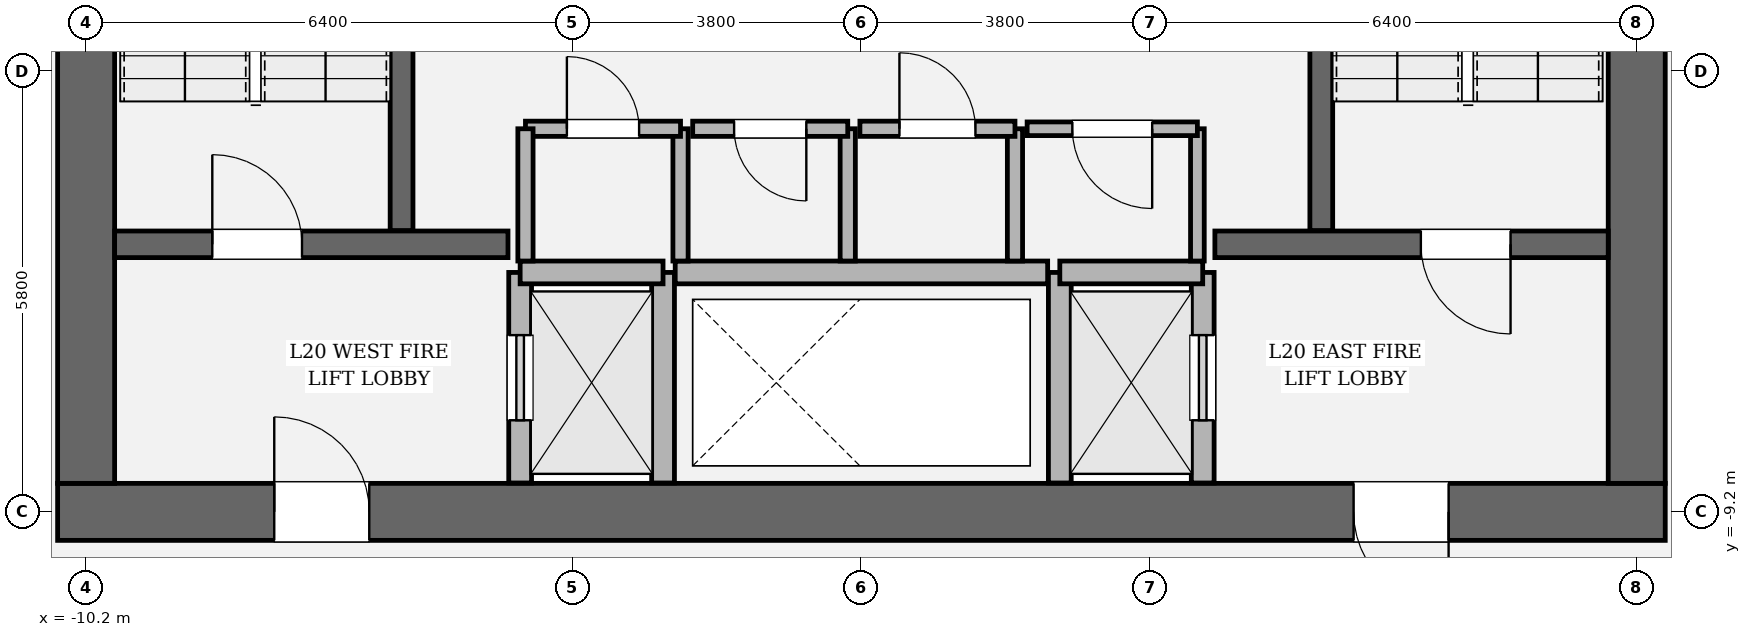
"""IFC4 building model, lengths in metres.
Left out: names, types, materials, properties, quantities, classifications, styles, units other than length and angle.
Written with IfcOpenShell. Run it as: python <this file> out.ifc"""

import sys

from ifc_helpers import new_model, si_unit, direction, frame, frame_2d, origin, place, context, subcontext, project, spatial, rectangle, extrude, element, fill, save


model = new_model("IFC4")
c1 = context("Model", 3, precision=1e-05, world=origin(), true_north=direction((0.0, 1.0)))
c2 = subcontext(c1, "Body", "Model", "MODEL_VIEW")
j1 = project(units=[si_unit("LENGTHUNIT", "METRE"), si_unit("PLANEANGLEUNIT", "RADIAN")], contexts=[c1])
p1 = place(None, origin())
s1 = spatial("IfcSite", under=j1, at=p1, CompositionType="ELEMENT")
p2 = place(p1, origin())
s2 = spatial("IfcBuilding", under=s1, at=p2, CompositionType="ELEMENT")
p3 = place(p2, frame((0.0, 0.0, 88.95)))
s3 = spatial("IfcBuildingStorey", under=s2, at=p3, CompositionType="ELEMENT", Elevation=88.95)
p4 = place(p3, frame((10.575, -9.2, 0.0), z_axis=(0.0, 0.0, 1.0), x_axis=(-1.0, 0.0, 0.0)))
e1 = element("IfcWall", 1, at=p4, inside=s3, PredefinedType="SHEAR", context=c2, shape_type="SweptSolid", body=[
    extrude(rectangle(XDim=21.15, YDim=0.75, at=frame_2d((10.575, 0.0))), origin(), (0.0, 0.0, 1.0), 4.05),
])
p5 = place(p4, frame((2.85, 0.0, 0.0)))
e2 = element("IfcOpeningElement", 2, at=p5, cuts=e1, PredefinedType="OPENING", context=c2, shape_type="SweptSolid", body=[
    extrude(rectangle(XDim=1.25, YDim=2.25, at=frame_2d((0.625, 1.125))), frame((0.0, 0.385, 0.0), z_axis=(0.0, -1.0, 0.0), x_axis=(1.0, 0.0, 0.0)), (0.0, 0.0, 1.0), 0.77),
])
p6 = place(p4, frame((17.05, 0.0, 0.0)))
e3 = element("IfcOpeningElement", 3, at=p6, cuts=e1, PredefinedType="OPENING", context=c2, shape_type="SweptSolid", body=[
    extrude(rectangle(XDim=1.25, YDim=2.25, at=frame_2d((0.625, 1.125))), frame((0.0, 0.385, 0.0), z_axis=(0.0, -1.0, 0.0), x_axis=(1.0, 0.0, 0.0)), (0.0, 0.0, 1.0), 0.77),
])
p7 = place(p3, frame((-10.2, -8.825, 0.0), z_axis=(0.0, 0.0, 1.0), x_axis=(0.0, 1.0, 0.0)))
e4 = element("IfcWall", 4, at=p7, inside=s3, PredefinedType="SHEAR", context=c2, shape_type="SweptSolid", body=[
    extrude(rectangle(XDim=17.65, YDim=0.75, at=frame_2d((8.825, 0.0))), origin(), (0.0, 0.0, 1.0), 4.05),
])
p8 = place(p7, frame((12.615, 0.0, 0.0)))
e5 = element("IfcOpeningElement", 5, at=p8, cuts=e4, PredefinedType="OPENING", context=c2, shape_type="SweptSolid", body=[
    extrude(rectangle(XDim=1.18, YDim=2.2, at=frame_2d((0.59, 1.1))), frame((0.0, 0.385, 0.0), z_axis=(0.0, -1.0, 0.0), x_axis=(1.0, 0.0, 0.0)), (0.0, 0.0, 1.0), 0.77),
])
p9 = place(p3, frame((10.2, 8.825, 0.0), z_axis=(0.0, 0.0, 1.0), x_axis=(0.0, -1.0, 0.0)))
e6 = element("IfcWall", 6, at=p9, inside=s3, PredefinedType="SHEAR", context=c2, shape_type="SweptSolid", body=[
    extrude(rectangle(XDim=17.65, YDim=0.75, at=frame_2d((8.825, 0.0))), origin(), (0.0, 0.0, 1.0), 4.05),
])
p10 = place(p9, frame((3.855, 0.0, 0.0)))
e7 = element("IfcOpeningElement", 7, at=p10, cuts=e6, PredefinedType="OPENING", context=c2, shape_type="SweptSolid", body=[
    extrude(rectangle(XDim=1.18, YDim=2.2, at=frame_2d((0.59, 1.1))), frame((0.0, 0.385, 0.0), z_axis=(0.0, -1.0, 0.0), x_axis=(1.0, 0.0, 0.0)), (0.0, 0.0, 1.0), 0.77),
])
for number, where, z_axis, x_axis in (
    (8, (-6.05, -5.5, 0.0), (0.0, 0.0, 1.0), (0.0, 1.0, 0.0)),
    (9, (6.05, 3.45, 0.0), (0.0, 0.0, 1.0), (0.0, -1.0, 0.0)),
):
    element("IfcWall", number, at=place(p3, frame(where, z_axis=z_axis, x_axis=x_axis)), inside=s3, PredefinedType="SOLIDWALL", context=c2, shape_type="SweptSolid", body=[
        extrude(rectangle(XDim=8.95, YDim=0.3, at=frame_2d((4.475, 0.0))), origin(), (0.0, 0.0, 1.0), 4.05),
    ])
p11 = place(p3, frame((-9.825, -5.68, 0.0), z_axis=(0.0, 0.0, 1.0), x_axis=(1.0, 0.0, 0.0)))
e10 = element("IfcWall", 10, at=p11, inside=s3, PredefinedType="SOLIDWALL", context=c2, shape_type="SweptSolid", body=[
    extrude(rectangle(XDim=5.175, YDim=0.35, at=frame_2d((2.587, 0.0))), origin(), (0.0, 0.0, 1.0), 4.05),
])
p12 = place(p11, frame((1.285, 0.0, 0.0)))
e11 = element("IfcOpeningElement", 11, at=p12, cuts=e10, PredefinedType="OPENING", context=c2, shape_type="SweptSolid", body=[
    extrude(rectangle(XDim=1.18, YDim=2.2, at=frame_2d((0.59, 1.1))), frame((0.0, 0.185, 0.0), z_axis=(0.0, -1.0, 0.0), x_axis=(1.0, 0.0, 0.0)), (0.0, 0.0, 1.0), 0.37),
])
p13 = place(p3, frame((4.65, -5.68, 0.0), z_axis=(0.0, 0.0, 1.0), x_axis=(1.0, 0.0, 0.0)))
e12 = element("IfcWall", 12, at=p13, inside=s3, PredefinedType="SOLIDWALL", context=c2, shape_type="SweptSolid", body=[
    extrude(rectangle(XDim=5.175, YDim=0.35, at=frame_2d((2.587, 0.0))), origin(), (0.0, 0.0, 1.0), 4.05),
])
p14 = place(p13, frame((2.71, 0.0, 0.0)))
e13 = element("IfcOpeningElement", 13, at=p14, cuts=e12, PredefinedType="OPENING", context=c2, shape_type="SweptSolid", body=[
    extrude(rectangle(XDim=1.18, YDim=2.2, at=frame_2d((0.59, 1.1))), frame((0.0, 0.185, 0.0), z_axis=(0.0, -1.0, 0.0), x_axis=(1.0, 0.0, 0.0)), (0.0, 0.0, 1.0), 0.37),
])
p15 = place(p3, frame((-4.49, -8.82, 0.0), z_axis=(0.0, 0.0, 1.0), x_axis=(0.0, 1.0, 0.0)))
e14 = element("IfcWall", 14, at=p15, inside=s3, PredefinedType="SOLIDWALL", context=c2, shape_type="SweptSolid", body=[
    extrude(rectangle(XDim=2.77, YDim=0.3, at=frame_2d((1.385, 0.0))), origin(), (0.0, 0.0, 1.0), 3.77),
])
p16 = place(p15, frame((0.825, 0.0, 0.0)))
e15 = element("IfcOpeningElement", 15, at=p16, cuts=e14, PredefinedType="OPENING", context=c2, shape_type="SweptSolid", body=[
    extrude(rectangle(XDim=1.12, YDim=2.25, at=frame_2d((0.56, 1.125))), frame((0.0, 0.16, 0.0), z_axis=(0.0, -1.0, 0.0), x_axis=(1.0, 0.0, 0.0)), (0.0, 0.0, 1.0), 0.32),
])
p17 = place(p3, frame((-2.61, -8.82, 0.0), z_axis=(0.0, 0.0, 1.0), x_axis=(0.0, 1.0, 0.0)))
e16 = element("IfcWall", 16, at=p17, inside=s3, PredefinedType="SOLIDWALL", context=c2, shape_type="SweptSolid", body=[
    extrude(rectangle(XDim=2.77, YDim=0.3, at=frame_2d((1.385, 0.0))), origin(), (0.0, 0.0, 1.0), 3.77),
])
p18 = place(p3, frame((-4.49, -6.05, 0.0), z_axis=(0.0, 0.0, 1.0), x_axis=(1.0, 0.0, 0.0)))
e17 = element("IfcWall", 17, at=p18, inside=s3, PredefinedType="SOLIDWALL", context=c2, shape_type="SweptSolid", body=[
    extrude(rectangle(XDim=1.88, YDim=0.3, at=frame_2d((0.94, 0.0))), origin(), (0.0, 0.0, 1.0), 3.77),
])
p19 = place(p3, frame((4.49, -8.82, 0.0), z_axis=(0.0, 0.0, 1.0), x_axis=(0.0, 1.0, 0.0)))
e18 = element("IfcWall", 18, at=p19, inside=s3, PredefinedType="SOLIDWALL", context=c2, shape_type="SweptSolid", body=[
    extrude(rectangle(XDim=2.77, YDim=0.3, at=frame_2d((1.385, 0.0))), origin(), (0.0, 0.0, 1.0), 3.77),
])
p20 = place(p19, frame((0.825, 0.0, 0.0)))
e19 = element("IfcOpeningElement", 19, at=p20, cuts=e18, PredefinedType="OPENING", context=c2, shape_type="SweptSolid", body=[
    extrude(rectangle(XDim=1.12, YDim=2.25, at=frame_2d((0.56, 1.125))), frame((0.0, 0.16, 0.0), z_axis=(0.0, -1.0, 0.0), x_axis=(1.0, 0.0, 0.0)), (0.0, 0.0, 1.0), 0.32),
])
p21 = place(p3, frame((2.61, -8.82, 0.0), z_axis=(0.0, 0.0, 1.0), x_axis=(0.0, 1.0, 0.0)))
e20 = element("IfcWall", 20, at=p21, inside=s3, PredefinedType="SOLIDWALL", context=c2, shape_type="SweptSolid", body=[
    extrude(rectangle(XDim=2.77, YDim=0.3, at=frame_2d((1.385, 0.0))), origin(), (0.0, 0.0, 1.0), 3.77),
])
p22 = place(p3, frame((2.61, -6.05, 0.0), z_axis=(0.0, 0.0, 1.0), x_axis=(1.0, 0.0, 0.0)))
e21 = element("IfcWall", 21, at=p22, inside=s3, PredefinedType="SOLIDWALL", context=c2, shape_type="SweptSolid", body=[
    extrude(rectangle(XDim=1.88, YDim=0.3, at=frame_2d((0.94, 0.0))), origin(), (0.0, 0.0, 1.0), 3.77),
])
p23 = place(p3, frame((-2.45, -6.05, 0.0), z_axis=(0.0, 0.0, 1.0), x_axis=(1.0, 0.0, 0.0)))
e22 = element("IfcWall", 22, at=p23, inside=s3, PredefinedType="SOLIDWALL", context=c2, shape_type="SweptSolid", body=[
    extrude(rectangle(XDim=4.9, YDim=0.3, at=frame_2d((2.45, 0.0))), origin(), (0.0, 0.0, 1.0), 3.77),
])
p24 = place(p3, frame((-2.38, -5.9, 0.0), z_axis=(0.0, 0.0, 1.0), x_axis=(0.0, 1.0, 0.0)))
e23 = element("IfcWall", 23, at=p24, inside=s3, PredefinedType="SOLIDWALL", context=c2, shape_type="SweptSolid", body=[
    extrude(rectangle(XDim=1.74, YDim=0.2, at=frame_2d((0.87, 0.0))), origin(), (0.0, 0.0, 1.0), 3.77),
])
p25 = place(p3, frame((-2.38, -4.16, 0.0), z_axis=(0.0, 0.0, 1.0), x_axis=(-1.0, 0.0, 0.0)))
e24 = element("IfcWall", 24, at=p25, inside=s3, PredefinedType="SOLIDWALL", context=c2, shape_type="SweptSolid", body=[
    extrude(rectangle(XDim=2.04, YDim=0.2, at=frame_2d((1.02, 0.0))), origin(), (0.0, 0.0, 1.0), 3.77),
])
p26 = place(p25, frame((0.545, 0.0, 0.0)))
e25 = element("IfcOpeningElement", 25, at=p26, cuts=e24, PredefinedType="OPENING", context=c2, shape_type="SweptSolid", body=[
    extrude(rectangle(XDim=0.95, YDim=2.15, at=frame_2d((0.475, 1.075))), frame((0.0, 0.11, 0.0), z_axis=(0.0, -1.0, 0.0), x_axis=(1.0, 0.0, 0.0)), (0.0, 0.0, 1.0), 0.22),
])
for number, where, z_axis, x_axis in (
    (26, (-4.42, -4.16, 0.0), (0.0, 0.0, 1.0), (0.0, -1.0, 0.0)),
    (27, (-0.18, -5.9, 0.0), (0.0, 0.0, 1.0), (0.0, 1.0, 0.0)),
):
    element("IfcWall", number, at=place(p3, frame(where, z_axis=z_axis, x_axis=x_axis)), inside=s3, PredefinedType="SOLIDWALL", context=c2, shape_type="SweptSolid", body=[
        extrude(rectangle(XDim=1.74, YDim=0.2, at=frame_2d((0.87, 0.0))), origin(), (0.0, 0.0, 1.0), 3.77),
    ])
p27 = place(p3, frame((-0.18, -4.16, 0.0), z_axis=(0.0, 0.0, 1.0), x_axis=(-1.0, 0.0, 0.0)))
e28 = element("IfcWall", 28, at=p27, inside=s3, PredefinedType="SOLIDWALL", context=c2, shape_type="SweptSolid", body=[
    extrude(rectangle(XDim=2.04, YDim=0.2, at=frame_2d((1.02, 0.0))), origin(), (0.0, 0.0, 1.0), 3.77),
])
p28 = place(p27, frame((0.545, 0.0, 0.0)))
e29 = element("IfcOpeningElement", 29, at=p28, cuts=e28, PredefinedType="OPENING", context=c2, shape_type="SweptSolid", body=[
    extrude(rectangle(XDim=0.95, YDim=2.15, at=frame_2d((0.475, 1.075))), frame((0.0, 0.11, 0.0), z_axis=(0.0, -1.0, 0.0), x_axis=(1.0, 0.0, 0.0)), (0.0, 0.0, 1.0), 0.22),
])
p29 = place(p3, frame((2.02, -5.9, 0.0), z_axis=(0.0, 0.0, 1.0), x_axis=(0.0, 1.0, 0.0)))
e30 = element("IfcWall", 30, at=p29, inside=s3, PredefinedType="SOLIDWALL", context=c2, shape_type="SweptSolid", body=[
    extrude(rectangle(XDim=1.74, YDim=0.2, at=frame_2d((0.87, 0.0))), origin(), (0.0, 0.0, 1.0), 3.77),
])
p30 = place(p3, frame((2.02, -4.16, 0.0), z_axis=(0.0, 0.0, 1.0), x_axis=(-1.0, 0.0, 0.0)))
e31 = element("IfcWall", 31, at=p30, inside=s3, PredefinedType="SOLIDWALL", context=c2, shape_type="SweptSolid", body=[
    extrude(rectangle(XDim=2.04, YDim=0.2, at=frame_2d((1.02, 0.0))), origin(), (0.0, 0.0, 1.0), 3.77),
])
p31 = place(p30, frame((0.52, 0.0, 0.0)))
e32 = element("IfcOpeningElement", 32, at=p31, cuts=e31, PredefinedType="OPENING", context=c2, shape_type="SweptSolid", body=[
    extrude(rectangle(XDim=1.0, YDim=2.15, at=frame_2d((0.5, 1.075))), frame((0.0, 0.11, 0.0), z_axis=(0.0, -1.0, 0.0), x_axis=(1.0, 0.0, 0.0)), (0.0, 0.0, 1.0), 0.22),
])
p32 = place(p3, frame((4.42, -5.9, 0.0), z_axis=(0.0, 0.0, 1.0), x_axis=(0.0, 1.0, 0.0)))
e33 = element("IfcWall", 33, at=p32, inside=s3, PredefinedType="PARTITIONING", context=c2, shape_type="SweptSolid", body=[
    extrude(rectangle(XDim=1.74, YDim=0.18, at=frame_2d((0.87, 0.0))), origin(), (0.0, 0.0, 1.0), 3.77),
])
p33 = place(p3, frame((4.42, -4.16, 0.0), z_axis=(0.0, 0.0, 1.0), x_axis=(-1.0, 0.0, 0.0)))
e34 = element("IfcWall", 34, at=p33, inside=s3, PredefinedType="PARTITIONING", context=c2, shape_type="SweptSolid", body=[
    extrude(rectangle(XDim=2.24, YDim=0.18, at=frame_2d((1.12, 0.0))), origin(), (0.0, 0.0, 1.0), 3.77),
])
p34 = place(p33, frame((0.595, 0.0, 0.0)))
e35 = element("IfcOpeningElement", 35, at=p34, cuts=e34, PredefinedType="OPENING", context=c2, shape_type="SweptSolid", body=[
    extrude(rectangle(XDim=1.05, YDim=2.2, at=frame_2d((0.525, 1.1))), frame((0.0, 0.1, 0.0), z_axis=(0.0, -1.0, 0.0), x_axis=(1.0, 0.0, 0.0)), (0.0, 0.0, 1.0), 0.2),
])
p35 = place(p12, origin())
e36 = element("IfcDoor", 36, at=p35, inside=s3, OperationType="SINGLE_SWING_LEFT", PredefinedType="DOOR", context=c2, shape_type="SweptSolid", body=[
    extrude(rectangle(XDim=1.18, YDim=2.2, at=frame_2d((0.59, 1.1))), frame((0.0, 0.025, 0.0), z_axis=(0.0, -1.0, 0.0), x_axis=(1.0, 0.0, 0.0)), (0.0, 0.0, 1.0), 0.05),
])
fill(e11, e36)
p36 = place(p14, origin())
e37 = element("IfcDoor", 37, at=p36, inside=s3, OperationType="SINGLE_SWING_RIGHT", PredefinedType="DOOR", context=c2, shape_type="SweptSolid", body=[
    extrude(rectangle(XDim=1.18, YDim=2.2, at=frame_2d((0.59, 1.1))), frame((0.0, 0.025, 0.0), z_axis=(0.0, -1.0, 0.0), x_axis=(1.0, 0.0, 0.0)), (0.0, 0.0, 1.0), 0.05),
])
fill(e13, e37)
p37 = place(p5, origin())
e38 = element("IfcDoor", 38, at=p37, inside=s3, OperationType="SINGLE_SWING_LEFT", PredefinedType="DOOR", context=c2, shape_type="SweptSolid", body=[
    extrude(rectangle(XDim=1.25, YDim=2.25, at=frame_2d((0.625, 1.125))), frame((0.0, 0.025, 0.0), z_axis=(0.0, -1.0, 0.0), x_axis=(1.0, 0.0, 0.0)), (0.0, 0.0, 1.0), 0.05),
])
fill(e2, e38)
p38 = place(p6, origin())
e39 = element("IfcDoor", 39, at=p38, inside=s3, OperationType="SINGLE_SWING_RIGHT", PredefinedType="DOOR", context=c2, shape_type="SweptSolid", body=[
    extrude(rectangle(XDim=1.25, YDim=2.25, at=frame_2d((0.625, 1.125))), frame((0.0, 0.025, 0.0), z_axis=(0.0, -1.0, 0.0), x_axis=(1.0, 0.0, 0.0)), (0.0, 0.0, 1.0), 0.05),
])
fill(e3, e39)
p39 = place(p16, origin())
e40 = element("IfcDoor", 40, at=p39, inside=s3, OperationType="SLIDING_TO_LEFT", PredefinedType="DOOR", context=c2, shape_type="SweptSolid", body=[
    extrude(rectangle(XDim=1.12, YDim=2.25, at=frame_2d((0.56, 1.125))), frame((0.0, 0.025, 0.0), z_axis=(0.0, -1.0, 0.0), x_axis=(1.0, 0.0, 0.0)), (0.0, 0.0, 1.0), 0.05),
])
fill(e15, e40)
p40 = place(p20, origin())
e41 = element("IfcDoor", 41, at=p40, inside=s3, OperationType="SLIDING_TO_RIGHT", PredefinedType="DOOR", context=c2, shape_type="SweptSolid", body=[
    extrude(rectangle(XDim=1.12, YDim=2.25, at=frame_2d((0.56, 1.125))), frame((0.0, 0.025, 0.0), z_axis=(0.0, -1.0, 0.0), x_axis=(1.0, 0.0, 0.0)), (0.0, 0.0, 1.0), 0.05),
])
fill(e19, e41)
p41 = place(p26, origin())
e42 = element("IfcDoor", 42, at=p41, inside=s3, OperationType="SINGLE_SWING_RIGHT", PredefinedType="DOOR", context=c2, shape_type="SweptSolid", body=[
    extrude(rectangle(XDim=0.95, YDim=2.15, at=frame_2d((0.475, 1.075))), frame((0.0, 0.025, 0.0), z_axis=(0.0, -1.0, 0.0), x_axis=(1.0, 0.0, 0.0)), (0.0, 0.0, 1.0), 0.05),
])
fill(e25, e42)
p42 = place(p28, origin())
e43 = element("IfcDoor", 43, at=p42, inside=s3, OperationType="SINGLE_SWING_LEFT", PredefinedType="DOOR", context=c2, shape_type="SweptSolid", body=[
    extrude(rectangle(XDim=0.95, YDim=2.15, at=frame_2d((0.475, 1.075))), frame((0.0, 0.025, 0.0), z_axis=(0.0, -1.0, 0.0), x_axis=(1.0, 0.0, 0.0)), (0.0, 0.0, 1.0), 0.05),
])
fill(e29, e43)
p43 = place(p31, origin())
e44 = element("IfcDoor", 44, at=p43, inside=s3, OperationType="SINGLE_SWING_RIGHT", PredefinedType="DOOR", context=c2, shape_type="SweptSolid", body=[
    extrude(rectangle(XDim=1.0, YDim=2.15, at=frame_2d((0.5, 1.075))), frame((0.0, 0.025, 0.0), z_axis=(0.0, -1.0, 0.0), x_axis=(1.0, 0.0, 0.0)), (0.0, 0.0, 1.0), 0.05),
])
fill(e32, e44)
p44 = place(p34, origin())
e45 = element("IfcDoor", 45, at=p44, inside=s3, OperationType="SINGLE_SWING_LEFT", PredefinedType="DOOR", context=c2, shape_type="SweptSolid", body=[
    extrude(rectangle(XDim=1.05, YDim=2.2, at=frame_2d((0.525, 1.1))), frame((0.0, 0.025, 0.0), z_axis=(0.0, -1.0, 0.0), x_axis=(1.0, 0.0, 0.0)), (0.0, 0.0, 1.0), 0.05),
])
fill(e35, e45)
save(model, sys.argv[1])
